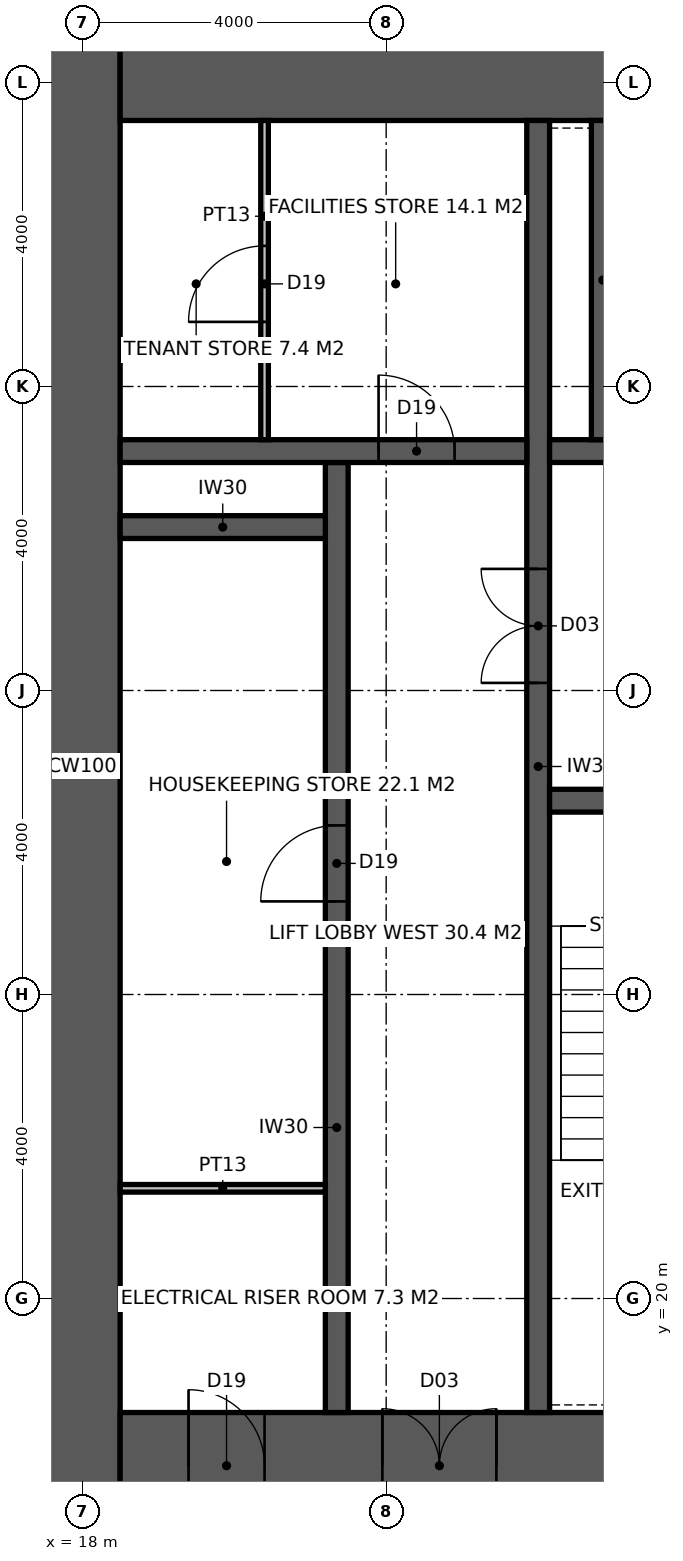
"""IFC4 building model, lengths in metres.
Left out: names, types, materials, properties, quantities, classifications, styles, units other than length and angle.
Written with IfcOpenShell. Run it as: python <this file> out.ifc"""

import sys

from ifc_helpers import new_model, si_unit, direction, frame, frame_2d, origin, place, context, subcontext, project, spatial, rectangle, extrude, element, fill, save


model = new_model("IFC4")
c1 = context("Model", 3, precision=1e-05, world=origin(), true_north=direction((0.0, 1.0)))
c2 = subcontext(c1, "Body", "Model", "MODEL_VIEW")
j1 = project(units=[si_unit("LENGTHUNIT", "METRE"), si_unit("PLANEANGLEUNIT", "RADIAN")], contexts=[c1])
p1 = place(None, origin())
s1 = spatial("IfcSite", under=j1, at=p1, CompositionType="ELEMENT")
p2 = place(p1, origin())
s2 = spatial("IfcBuilding", under=s1, at=p2, CompositionType="ELEMENT")
p3 = place(p2, frame((0.0, 0.0, 15.0)))
s3 = spatial("IfcBuildingStorey", under=s2, at=p3, CompositionType="ELEMENT", Elevation=15.0)
p4 = place(p3, frame((18.0, 17.1, -0.15), z_axis=(0.0, 0.0, 1.0), x_axis=(0.0, 1.0, 0.0)))
e1 = element("IfcWall", 1, at=p4, inside=s3, PredefinedType="SHEAR", context=c2, shape_type="SweptSolid", body=[
    extrude(rectangle(XDim=19.8, YDim=1.0, at=frame_2d((9.9, 0.0))), origin(), (0.0, 0.0, 1.0), 4.0),
])
p5 = place(p3, frame((18.5, 17.8, -0.15), z_axis=(0.0, 0.0, 1.0), x_axis=(1.0, 0.0, 0.0)))
e2 = element("IfcWall", 2, at=p5, inside=s3, PredefinedType="SHEAR", context=c2, shape_type="SweptSolid", body=[
    extrude(rectangle(XDim=23.0, YDim=1.4, at=frame_2d((11.5, 0.0))), origin(), (0.0, 0.0, 1.0), 4.0),
])
p6 = place(p5, frame((3.45, 0.0, 0.15)))
e3 = element("IfcOpeningElement", 3, at=p6, cuts=e2, PredefinedType="OPENING", context=c2, shape_type="SweptSolid", body=[
    extrude(rectangle(XDim=1.5, YDim=2.4, at=frame_2d((0.75, 1.2))), frame((0.0, 0.71, 0.0), z_axis=(0.0, -1.0, 0.0), x_axis=(1.0, 0.0, 0.0)), (0.0, 0.0, 1.0), 1.42),
])
p7 = place(p5, frame((17.9, 0.0, 0.15)))
e4 = element("IfcOpeningElement", 4, at=p7, cuts=e2, PredefinedType="OPENING", context=c2, shape_type="SweptSolid", body=[
    extrude(rectangle(XDim=1.5, YDim=2.4, at=frame_2d((0.75, 1.2))), frame((0.0, 0.71, 0.0), z_axis=(0.0, -1.0, 0.0), x_axis=(1.0, 0.0, 0.0)), (0.0, 0.0, 1.0), 1.42),
])
p8 = place(p5, frame((0.9, 0.0, 0.15)))
e5 = element("IfcOpeningElement", 5, at=p8, cuts=e2, PredefinedType="OPENING", context=c2, shape_type="SweptSolid", body=[
    extrude(rectangle(XDim=1.0, YDim=2.2, at=frame_2d((0.5, 1.1))), frame((0.0, 0.71, 0.0), z_axis=(0.0, -1.0, 0.0), x_axis=(1.0, 0.0, 0.0)), (0.0, 0.0, 1.0), 1.42),
])
p9 = place(p3, frame((18.5, 36.2, -0.15), z_axis=(0.0, 0.0, 1.0), x_axis=(1.0, 0.0, 0.0)))
e6 = element("IfcWall", 6, at=p9, inside=s3, PredefinedType="SHEAR", context=c2, shape_type="SweptSolid", body=[
    extrude(rectangle(XDim=23.0, YDim=1.4, at=frame_2d((11.5, 0.0))), origin(), (0.0, 0.0, 1.0), 4.0),
])
p10 = place(p3, frame((24.0, 18.5, -0.15), z_axis=(0.0, 0.0, 1.0), x_axis=(0.0, 1.0, 0.0)))
e7 = element("IfcWall", 7, at=p10, inside=s3, PredefinedType="SHEAR", context=c2, shape_type="SweptSolid", body=[
    extrude(rectangle(XDim=17.0, YDim=0.3, at=frame_2d((8.5, 0.0))), origin(), (0.0, 0.0, 1.0), 4.0),
])
p11 = place(p10, frame((9.6, 0.0, 0.15)))
e8 = element("IfcOpeningElement", 8, at=p11, cuts=e7, PredefinedType="OPENING", context=c2, shape_type="SweptSolid", body=[
    extrude(rectangle(XDim=1.5, YDim=2.4, at=frame_2d((0.75, 1.2))), frame((0.0, 0.16, 0.0), z_axis=(0.0, -1.0, 0.0), x_axis=(1.0, 0.0, 0.0)), (0.0, 0.0, 1.0), 0.32),
])
p12 = place(p3, frame((24.15, 26.55, -0.15), z_axis=(0.0, 0.0, 1.0), x_axis=(1.0, 0.0, 0.0)))
e9 = element("IfcWall", 9, at=p12, inside=s3, PredefinedType="SHEAR", context=c2, shape_type="SweptSolid", body=[
    extrude(rectangle(XDim=11.25, YDim=0.3, at=frame_2d((5.625, 0.0))), origin(), (0.0, 0.0, 1.0), 4.0),
])
p13 = place(p12, frame((9.25, 0.0, 0.15)))
e10 = element("IfcOpeningElement", 10, at=p13, cuts=e9, PredefinedType="OPENING", context=c2, shape_type="SweptSolid", body=[
    extrude(rectangle(XDim=1.0, YDim=2.2, at=frame_2d((0.5, 1.1))), frame((0.0, 0.16, 0.0), z_axis=(0.0, -1.0, 0.0), x_axis=(1.0, 0.0, 0.0)), (0.0, 0.0, 1.0), 0.32),
])
p14 = place(p12, frame((4.9, 0.0, 0.15)))
e11 = element("IfcOpeningElement", 11, at=p14, cuts=e9, PredefinedType="OPENING", context=c2, shape_type="SweptSolid", body=[
    extrude(rectangle(XDim=1.5, YDim=2.4, at=frame_2d((0.75, 1.2))), frame((0.0, 0.16, 0.0), z_axis=(0.0, -1.0, 0.0), x_axis=(1.0, 0.0, 0.0)), (0.0, 0.0, 1.0), 0.32),
])
p15 = place(p3, frame((24.15, 31.15, -0.15), z_axis=(0.0, 0.0, 1.0), x_axis=(1.0, 0.0, 0.0)))
e12 = element("IfcWall", 12, at=p15, inside=s3, PredefinedType="SHEAR", context=c2, shape_type="SweptSolid", body=[
    extrude(rectangle(XDim=11.25, YDim=0.3, at=frame_2d((5.625, 0.0))), origin(), (0.0, 0.0, 1.0), 4.0),
])
p16 = place(p15, frame((7.25, 0.0, 0.15)))
e13 = element("IfcOpeningElement", 13, at=p16, cuts=e12, PredefinedType="OPENING", context=c2, shape_type="SweptSolid", body=[
    extrude(rectangle(XDim=1.4, YDim=2.4, at=frame_2d((0.7, 1.2))), frame((0.0, 0.16, 0.0), z_axis=(0.0, -1.0, 0.0), x_axis=(1.0, 0.0, 0.0)), (0.0, 0.0, 1.0), 0.32),
])
p17 = place(p3, frame((21.35, 18.5, -0.15), z_axis=(0.0, 0.0, 1.0), x_axis=(0.0, 1.0, 0.0)))
e14 = element("IfcWall", 14, at=p17, inside=s3, PredefinedType="SHEAR", context=c2, shape_type="SweptSolid", body=[
    extrude(rectangle(XDim=12.5, YDim=0.3, at=frame_2d((6.25, 0.0))), origin(), (0.0, 0.0, 1.0), 4.0),
])
p18 = place(p17, frame((6.725, 0.0, 0.15)))
e15 = element("IfcOpeningElement", 15, at=p18, cuts=e14, PredefinedType="OPENING", context=c2, shape_type="SweptSolid", body=[
    extrude(rectangle(XDim=1.0, YDim=2.2, at=frame_2d((0.5, 1.1))), frame((0.0, 0.16, 0.0), z_axis=(0.0, -1.0, 0.0), x_axis=(1.0, 0.0, 0.0)), (0.0, 0.0, 1.0), 0.32),
])
p19 = place(p3, frame((18.5, 31.15, -0.15), z_axis=(0.0, 0.0, 1.0), x_axis=(1.0, 0.0, 0.0)))
e16 = element("IfcWall", 16, at=p19, inside=s3, PredefinedType="SHEAR", context=c2, shape_type="SweptSolid", body=[
    extrude(rectangle(XDim=5.35, YDim=0.3, at=frame_2d((2.675, 0.0))), origin(), (0.0, 0.0, 1.0), 4.0),
])
p20 = place(p19, frame((3.4, 0.0, 0.15)))
e17 = element("IfcOpeningElement", 17, at=p20, cuts=e16, PredefinedType="OPENING", context=c2, shape_type="SweptSolid", body=[
    extrude(rectangle(XDim=1.0, YDim=2.2, at=frame_2d((0.5, 1.1))), frame((0.0, 0.16, 0.0), z_axis=(0.0, -1.0, 0.0), x_axis=(1.0, 0.0, 0.0)), (0.0, 0.0, 1.0), 0.32),
])
p21 = place(p3, frame((18.5, 30.15, -0.15), z_axis=(0.0, 0.0, 1.0), x_axis=(1.0, 0.0, 0.0)))
e18 = element("IfcWall", 18, at=p21, inside=s3, PredefinedType="SHEAR", context=c2, shape_type="SweptSolid", body=[
    extrude(rectangle(XDim=2.7, YDim=0.3, at=frame_2d((1.35, 0.0))), origin(), (0.0, 0.0, 1.0), 4.0),
])
p22 = place(p3, frame((24.85, 31.3, -0.15), z_axis=(0.0, 0.0, 1.0), x_axis=(0.0, 1.0, 0.0)))
e19 = element("IfcWall", 19, at=p22, inside=s3, PredefinedType="SHEAR", context=c2, shape_type="SweptSolid", body=[
    extrude(rectangle(XDim=4.2, YDim=0.3, at=frame_2d((2.1, 0.0))), origin(), (0.0, 0.0, 1.0), 4.0),
])
p23 = place(p3, frame((20.4, 31.3, 0.0), z_axis=(0.0, 0.0, 1.0), x_axis=(0.0, 1.0, 0.0)))
e20 = element("IfcWall", 20, at=p23, inside=s3, PredefinedType="PARTITIONING", context=c2, shape_type="SweptSolid", body=[
    extrude(rectangle(XDim=4.2, YDim=0.1, at=frame_2d((2.1, 0.0))), origin(), (0.0, 0.0, 1.0), 3.85),
])
p24 = place(p23, frame((1.55, 0.0, 0.0)))
e21 = element("IfcOpeningElement", 21, at=p24, cuts=e20, PredefinedType="OPENING", context=c2, shape_type="SweptSolid", body=[
    extrude(rectangle(XDim=1.0, YDim=2.2, at=frame_2d((0.5, 1.1))), frame((0.0, 0.06, 0.0), z_axis=(0.0, -1.0, 0.0), x_axis=(1.0, 0.0, 0.0)), (0.0, 0.0, 1.0), 0.12),
])
p25 = place(p3, frame((18.5, 21.45, 0.0), z_axis=(0.0, 0.0, 1.0), x_axis=(1.0, 0.0, 0.0)))
e22 = element("IfcWall", 22, at=p25, inside=s3, PredefinedType="PARTITIONING", context=c2, shape_type="SweptSolid", body=[
    extrude(rectangle(XDim=2.7, YDim=0.1, at=frame_2d((1.35, 0.0))), origin(), (0.0, 0.0, 1.0), 3.85),
])
p26 = place(p11, origin())
e23 = element("IfcDoor", 23, at=p26, inside=s3, OperationType="DOUBLE_DOOR_DOUBLE_SWING", PredefinedType="DOOR", context=c2, shape_type="SweptSolid", body=[
    extrude(rectangle(XDim=1.5, YDim=2.4, at=frame_2d((0.75, 1.2))), frame((0.0, 0.025, 0.0), z_axis=(0.0, -1.0, 0.0), x_axis=(1.0, 0.0, 0.0)), (0.0, 0.0, 1.0), 0.05),
])
fill(e8, e23)
p27 = place(p20, origin())
e24 = element("IfcDoor", 24, at=p27, inside=s3, OperationType="SINGLE_SWING_LEFT", PredefinedType="DOOR", context=c2, shape_type="SweptSolid", body=[
    extrude(rectangle(XDim=1.0, YDim=2.2, at=frame_2d((0.5, 1.1))), frame((0.0, 0.025, 0.0), z_axis=(0.0, -1.0, 0.0), x_axis=(1.0, 0.0, 0.0)), (0.0, 0.0, 1.0), 0.05),
])
fill(e17, e24)
p28 = place(p24, origin())
e25 = element("IfcDoor", 25, at=p28, inside=s3, OperationType="SINGLE_SWING_LEFT", PredefinedType="DOOR", context=c2, shape_type="SweptSolid", body=[
    extrude(rectangle(XDim=1.0, YDim=2.2, at=frame_2d((0.5, 1.1))), frame((0.0, 0.025, 0.0), z_axis=(0.0, -1.0, 0.0), x_axis=(1.0, 0.0, 0.0)), (0.0, 0.0, 1.0), 0.05),
])
fill(e21, e25)
p29 = place(p18, origin())
e26 = element("IfcDoor", 26, at=p29, inside=s3, OperationType="SINGLE_SWING_LEFT", PredefinedType="DOOR", context=c2, shape_type="SweptSolid", body=[
    extrude(rectangle(XDim=1.0, YDim=2.2, at=frame_2d((0.5, 1.1))), frame((0.0, 0.025, 0.0), z_axis=(0.0, -1.0, 0.0), x_axis=(1.0, 0.0, 0.0)), (0.0, 0.0, 1.0), 0.05),
])
fill(e15, e26)
p30 = place(p6, origin())
e27 = element("IfcDoor", 27, at=p30, inside=s3, OperationType="DOUBLE_DOOR_DOUBLE_SWING", PredefinedType="DOOR", context=c2, shape_type="SweptSolid", body=[
    extrude(rectangle(XDim=1.5, YDim=2.4, at=frame_2d((0.75, 1.2))), frame((0.0, 0.025, 0.0), z_axis=(0.0, -1.0, 0.0), x_axis=(1.0, 0.0, 0.0)), (0.0, 0.0, 1.0), 0.05),
])
fill(e3, e27)
p31 = place(p8, origin())
e28 = element("IfcDoor", 28, at=p31, inside=s3, OperationType="SINGLE_SWING_LEFT", PredefinedType="DOOR", context=c2, shape_type="SweptSolid", body=[
    extrude(rectangle(XDim=1.0, YDim=2.2, at=frame_2d((0.5, 1.1))), frame((0.0, 0.025, 0.0), z_axis=(0.0, -1.0, 0.0), x_axis=(1.0, 0.0, 0.0)), (0.0, 0.0, 1.0), 0.05),
])
fill(e5, e28)
save(model, sys.argv[1])
